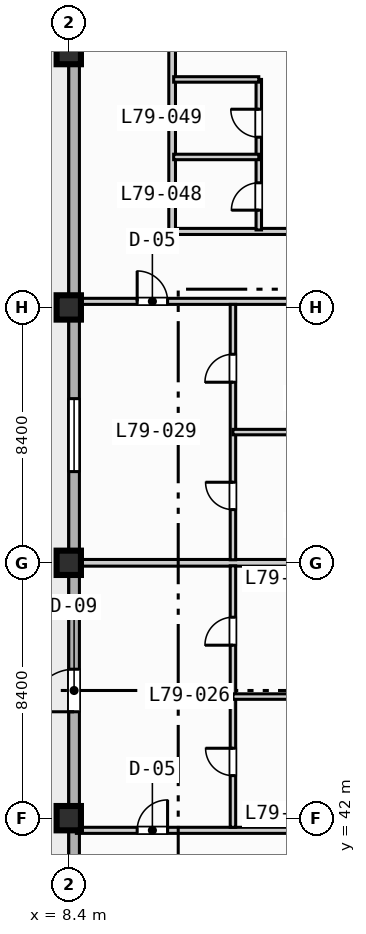
"""IFC4 building model, lengths in metres.
Left out: names, types, materials, properties, quantities, classifications, styles, units other than length and angle.
Written with IfcOpenShell. Run it as: python <this file> out.ifc"""

import sys

from ifc_helpers import new_model, si_unit, direction, frame, frame_2d, origin, origin_2d, place, context, subcontext, project, spatial, rectangle, extrude, element, fill, save


model = new_model("IFC4")
c1 = context("Model", 3, precision=1e-05, world=origin(), true_north=direction((0.0, 1.0)))
c2 = subcontext(c1, "Body", "Model", "MODEL_VIEW")
j1 = project(units=[si_unit("LENGTHUNIT", "METRE"), si_unit("PLANEANGLEUNIT", "RADIAN")], contexts=[c1])
p1 = place(None, origin())
s1 = spatial("IfcSite", under=j1, at=p1, CompositionType="ELEMENT")
p2 = place(p1, origin())
s2 = spatial("IfcBuilding", under=s1, at=p2, CompositionType="ELEMENT")
p3 = place(p2, frame((0.0, 0.0, 320.3)))
s3 = spatial("IfcBuildingStorey", under=s2, at=p3, CompositionType="ELEMENT", Elevation=320.3)
for number, where, z_axis, x_axis in (
    (1, (8.4, 42.0, 0.0), (0.0, 0.0, 1.0), (1.0, 0.0, 0.0)),
    (2, (8.4, 50.4, 0.0), (0.0, 0.0, 1.0), (1.0, 0.0, 0.0)),
    (3, (8.4, 58.8, 0.0), (0.0, 0.0, 1.0), (1.0, 0.0, 0.0)),
    (4, (8.4, 67.2, 0.0), (0.0, 0.0, 1.0), (1.0, 0.0, 0.0)),
):
    element("IfcColumn", number, at=place(p3, frame(where, z_axis=z_axis, x_axis=x_axis)), inside=s3, PredefinedType="COLUMN", context=c2, shape_type="SweptSolid", body=[
        extrude(rectangle(XDim=0.8, YDim=0.8, at=origin_2d()), origin(), (0.0, 0.0, 1.0), 3.9),
    ])
p4 = place(p3, frame((8.575, 11.575, 0.0), z_axis=(0.0, 0.0, 1.0), x_axis=(0.0, 1.0, 0.0)))
e5 = element("IfcWall", 5, at=p4, inside=s3, PredefinedType="STANDARD", context=c2, shape_type="SweptSolid", body=[
    extrude(rectangle(XDim=60.85, YDim=0.35, at=frame_2d((30.425, 0.0))), origin(), (0.0, 0.0, 1.0), 3.67),
])
p5 = place(p4, frame((33.925, 0.0, 0.0)))
e6 = element("IfcOpeningElement", 6, at=p5, cuts=e5, PredefinedType="OPENING", context=c2, shape_type="SweptSolid", body=[
    extrude(rectangle(XDim=1.4, YDim=2.2, at=frame_2d((0.7, 1.1))), frame((0.0, 0.185, 0.0), z_axis=(0.0, -1.0, 0.0), x_axis=(1.0, 0.0, 0.0)), (0.0, 0.0, 1.0), 0.37),
])
p6 = place(p4, frame((25.025, 0.0, 0.85)))
e7 = element("IfcOpeningElement", 7, at=p6, cuts=e5, PredefinedType="OPENING", context=c2, shape_type="SweptSolid", body=[
    extrude(rectangle(XDim=2.4, YDim=1.95, at=frame_2d((1.2, 0.975))), frame((0.0, 0.185, 0.0), z_axis=(0.0, -1.0, 0.0), x_axis=(1.0, 0.0, 0.0)), (0.0, 0.0, 1.0), 0.37),
])
p7 = place(p4, frame((41.825, 0.0, 0.85)))
e8 = element("IfcOpeningElement", 8, at=p7, cuts=e5, PredefinedType="OPENING", context=c2, shape_type="SweptSolid", body=[
    extrude(rectangle(XDim=2.4, YDim=1.95, at=frame_2d((1.2, 0.975))), frame((0.0, 0.185, 0.0), z_axis=(0.0, -1.0, 0.0), x_axis=(1.0, 0.0, 0.0)), (0.0, 0.0, 1.0), 0.37),
])
p8 = place(p4, frame((19.25, 0.0, 0.85)))
e9 = element("IfcOpeningElement", 9, at=p8, cuts=e5, PredefinedType="OPENING", context=c2, shape_type="SweptSolid", body=[
    extrude(rectangle(XDim=1.8, YDim=1.8, at=frame_2d((0.9, 0.9))), frame((0.0, 0.185, 0.0), z_axis=(0.0, -1.0, 0.0), x_axis=(1.0, 0.0, 0.0)), (0.0, 0.0, 1.0), 0.37),
])
p9 = place(p3, frame((8.65, 41.6, 0.0), z_axis=(0.0, 0.0, 1.0), x_axis=(1.0, 0.0, 0.0)))
e10 = element("IfcWall", 10, at=p9, inside=s3, PredefinedType="PARTITIONING", context=c2, shape_type="SweptSolid", body=[
    extrude(rectangle(XDim=7.95, YDim=0.2, at=frame_2d((3.975, 0.0))), origin(), (0.0, 0.0, 1.0), 3.67),
])
p10 = place(p9, frame((2.0, 0.0, 0.0)))
e11 = element("IfcOpeningElement", 11, at=p10, cuts=e10, PredefinedType="OPENING", context=c2, shape_type="SweptSolid", body=[
    extrude(rectangle(XDim=1.0, YDim=2.15, at=frame_2d((0.5, 1.075))), frame((0.0, 0.11, 0.0), z_axis=(0.0, -1.0, 0.0), x_axis=(1.0, 0.0, 0.0)), (0.0, 0.0, 1.0), 0.22),
])
p11 = place(p3, frame((8.65, 59.0, 0.0), z_axis=(0.0, 0.0, 1.0), x_axis=(1.0, 0.0, 0.0)))
e12 = element("IfcWall", 12, at=p11, inside=s3, PredefinedType="PARTITIONING", context=c2, shape_type="SweptSolid", body=[
    extrude(rectangle(XDim=7.95, YDim=0.2, at=frame_2d((3.975, 0.0))), origin(), (0.0, 0.0, 1.0), 3.253),
])
p12 = place(p11, frame((2.0, 0.0, 0.0)))
e13 = element("IfcOpeningElement", 13, at=p12, cuts=e12, PredefinedType="OPENING", context=c2, shape_type="SweptSolid", body=[
    extrude(rectangle(XDim=1.0, YDim=2.15, at=frame_2d((0.5, 1.075))), frame((0.0, 0.11, 0.0), z_axis=(0.0, -1.0, 0.0), x_axis=(1.0, 0.0, 0.0)), (0.0, 0.0, 1.0), 0.22),
])
p13 = place(p3, frame((8.65, 50.4, 0.0), z_axis=(0.0, 0.0, 1.0), x_axis=(1.0, 0.0, 0.0)))
e14 = element("IfcWall", 14, at=p13, inside=s3, PredefinedType="PARTITIONING", context=c2, shape_type="SweptSolid", body=[
    extrude(rectangle(XDim=7.95, YDim=0.22, at=frame_2d((3.975, 0.0))), origin(), (0.0, 0.0, 1.0), 3.07),
])
p14 = place(p3, frame((13.8, 41.7, 0.0), z_axis=(0.0, 0.0, 1.0), x_axis=(0.0, 1.0, 0.0)))
e15 = element("IfcWall", 15, at=p14, inside=s3, PredefinedType="PLUMBINGWALL", context=c2, shape_type="SweptSolid", body=[
    extrude(rectangle(XDim=8.6, YDim=0.18, at=frame_2d((4.3, 0.0))), origin(), (0.0, 0.0, 1.0), 3.67),
])
p15 = place(p14, frame((1.7, 0.0, 0.0)))
e16 = element("IfcOpeningElement", 16, at=p15, cuts=e15, PredefinedType="OPENING", context=c2, shape_type="SweptSolid", body=[
    extrude(rectangle(XDim=0.9, YDim=2.1, at=frame_2d((0.45, 1.05))), frame((0.0, 0.1, 0.0), z_axis=(0.0, -1.0, 0.0), x_axis=(1.0, 0.0, 0.0)), (0.0, 0.0, 1.0), 0.2),
])
p16 = place(p14, frame((5.99, 0.0, 0.0)))
e17 = element("IfcOpeningElement", 17, at=p16, cuts=e15, PredefinedType="OPENING", context=c2, shape_type="SweptSolid", body=[
    extrude(rectangle(XDim=0.92, YDim=2.1, at=frame_2d((0.46, 1.05))), frame((0.0, 0.1, 0.0), z_axis=(0.0, -1.0, 0.0), x_axis=(1.0, 0.0, 0.0)), (0.0, 0.0, 1.0), 0.2),
])
p17 = place(p3, frame((13.8, 46.0, 0.0), z_axis=(0.0, 0.0, 1.0), x_axis=(1.0, 0.0, 0.0)))
e18 = element("IfcWall", 18, at=p17, inside=s3, PredefinedType="PLUMBINGWALL", context=c2, shape_type="SweptSolid", body=[
    extrude(rectangle(XDim=2.8, YDim=0.18, at=frame_2d((1.4, 0.0))), origin(), (0.0, 0.0, 1.0), 3.67),
])
p18 = place(p3, frame((13.8, 50.5, 0.0), z_axis=(0.0, 0.0, 1.0), x_axis=(0.0, 1.0, 0.0)))
e19 = element("IfcWall", 19, at=p18, inside=s3, PredefinedType="PLUMBINGWALL", context=c2, shape_type="SweptSolid", body=[
    extrude(rectangle(XDim=8.4, YDim=0.18, at=frame_2d((4.2, 0.0))), origin(), (0.0, 0.0, 1.0), 3.67),
])
p19 = place(p18, frame((1.65, 0.0, 0.0)))
e20 = element("IfcOpeningElement", 20, at=p19, cuts=e19, PredefinedType="OPENING", context=c2, shape_type="SweptSolid", body=[
    extrude(rectangle(XDim=0.9, YDim=2.1, at=frame_2d((0.45, 1.05))), frame((0.0, 0.1, 0.0), z_axis=(0.0, -1.0, 0.0), x_axis=(1.0, 0.0, 0.0)), (0.0, 0.0, 1.0), 0.2),
])
p20 = place(p18, frame((5.84, 0.0, 0.0)))
e21 = element("IfcOpeningElement", 21, at=p20, cuts=e19, PredefinedType="OPENING", context=c2, shape_type="SweptSolid", body=[
    extrude(rectangle(XDim=0.92, YDim=2.1, at=frame_2d((0.46, 1.05))), frame((0.0, 0.1, 0.0), z_axis=(0.0, -1.0, 0.0), x_axis=(1.0, 0.0, 0.0)), (0.0, 0.0, 1.0), 0.2),
])
p21 = place(p3, frame((13.8, 54.7, 0.0), z_axis=(0.0, 0.0, 1.0), x_axis=(1.0, 0.0, 0.0)))
e22 = element("IfcWall", 22, at=p21, inside=s3, PredefinedType="PLUMBINGWALL", context=c2, shape_type="SweptSolid", body=[
    extrude(rectangle(XDim=2.8, YDim=0.18, at=frame_2d((1.4, 0.0))), origin(), (0.0, 0.0, 1.0), 3.67),
])
p22 = place(p3, frame((11.8, 61.3, 0.0), z_axis=(0.0, 0.0, 1.0), x_axis=(1.0, 0.0, 0.0)))
e23 = element("IfcWall", 23, at=p22, inside=s3, PredefinedType="PARTITIONING", context=c2, shape_type="SweptSolid", body=[
    extrude(rectangle(XDim=21.35, YDim=0.2, at=frame_2d((10.675, 0.0))), origin(), (0.0, 0.0, 1.0), 3.67),
])
p23 = place(p22, frame((4.05, 0.0, 0.0)))
e24 = element("IfcOpeningElement", 24, at=p23, cuts=e23, PredefinedType="OPENING", context=c2, shape_type="SweptSolid", body=[
    extrude(rectangle(XDim=1.0, YDim=2.15, at=frame_2d((0.5, 1.075))), frame((0.0, 0.11, 0.0), z_axis=(0.0, -1.0, 0.0), x_axis=(1.0, 0.0, 0.0)), (0.0, 0.0, 1.0), 0.22),
])
p24 = place(p3, frame((11.8, 61.3, 0.0), z_axis=(0.0, 0.0, 1.0), x_axis=(0.0, 1.0, 0.0)))
e25 = element("IfcWall", 25, at=p24, inside=s3, PredefinedType="PARTITIONING", context=c2, shape_type="SweptSolid", body=[
    extrude(rectangle(XDim=11.1, YDim=0.22, at=frame_2d((5.55, 0.0))), origin(), (0.0, 0.0, 1.0), 3.67),
])
p25 = place(p3, frame((14.65, 61.35, 0.0), z_axis=(0.0, 0.0, 1.0), x_axis=(0.0, 1.0, 0.0)))
e26 = element("IfcWall", 26, at=p25, inside=s3, PredefinedType="PLUMBINGWALL", context=c2, shape_type="SweptSolid", body=[
    extrude(rectangle(XDim=4.95, YDim=0.18, at=frame_2d((2.475, 0.0))), origin(), (0.0, 0.0, 1.0), 3.67),
])
p26 = place(p25, frame((0.65, 0.0, 0.0)))
e27 = element("IfcOpeningElement", 27, at=p26, cuts=e26, PredefinedType="OPENING", context=c2, shape_type="SweptSolid", body=[
    extrude(rectangle(XDim=0.9, YDim=2.1, at=frame_2d((0.45, 1.05))), frame((0.0, 0.1, 0.0), z_axis=(0.0, -1.0, 0.0), x_axis=(1.0, 0.0, 0.0)), (0.0, 0.0, 1.0), 0.2),
])
p27 = place(p25, frame((3.05, 0.0, 0.0)))
e28 = element("IfcOpeningElement", 28, at=p27, cuts=e26, PredefinedType="OPENING", context=c2, shape_type="SweptSolid", body=[
    extrude(rectangle(XDim=0.92, YDim=2.1, at=frame_2d((0.46, 1.05))), frame((0.0, 0.1, 0.0), z_axis=(0.0, -1.0, 0.0), x_axis=(1.0, 0.0, 0.0)), (0.0, 0.0, 1.0), 0.2),
])
for number, where, z_axis, x_axis in (
    (29, (11.85, 63.75, 0.0), (0.0, 0.0, 1.0), (1.0, 0.0, 0.0)),
    (30, (11.85, 66.3, 0.0), (0.0, 0.0, 1.0), (1.0, 0.0, 0.0)),
):
    element("IfcWall", number, at=place(p3, frame(where, z_axis=z_axis, x_axis=x_axis)), inside=s3, PredefinedType="PLUMBINGWALL", context=c2, shape_type="SweptSolid", body=[
        extrude(rectangle(XDim=2.8, YDim=0.18, at=frame_2d((1.4, 0.0))), origin(), (0.0, 0.0, 1.0), 3.67),
    ])
p28 = place(p5, origin())
e31 = element("IfcDoor", 31, at=p28, inside=s3, OperationType="SINGLE_SWING_LEFT", PredefinedType="DOOR", context=c2, shape_type="SweptSolid", body=[
    extrude(rectangle(XDim=1.4, YDim=2.2, at=frame_2d((0.7, 1.1))), frame((0.0, 0.025, 0.0), z_axis=(0.0, -1.0, 0.0), x_axis=(1.0, 0.0, 0.0)), (0.0, 0.0, 1.0), 0.05),
])
fill(e6, e31)
p29 = place(p7, origin())
e32 = element("IfcWindow", 32, at=p29, inside=s3, PartitioningType="SINGLE_PANEL", PredefinedType="WINDOW", context=c2, shape_type="SweptSolid", body=[
    extrude(rectangle(XDim=2.4, YDim=1.95, at=frame_2d((1.2, 0.975))), frame((0.0, 0.03, 0.0), z_axis=(0.0, -1.0, 0.0), x_axis=(1.0, 0.0, 0.0)), (0.0, 0.0, 1.0), 0.06),
])
fill(e8, e32)
p30 = place(p10, origin())
e33 = element("IfcDoor", 33, at=p30, inside=s3, OperationType="SINGLE_SWING_RIGHT", PredefinedType="DOOR", context=c2, shape_type="SweptSolid", body=[
    extrude(rectangle(XDim=1.0, YDim=2.15, at=frame_2d((0.5, 1.075))), frame((0.0, 0.025, 0.0), z_axis=(0.0, -1.0, 0.0), x_axis=(1.0, 0.0, 0.0)), (0.0, 0.0, 1.0), 0.05),
])
fill(e11, e33)
p31 = place(p12, origin())
e34 = element("IfcDoor", 34, at=p31, inside=s3, OperationType="SINGLE_SWING_LEFT", PredefinedType="DOOR", context=c2, shape_type="SweptSolid", body=[
    extrude(rectangle(XDim=1.0, YDim=2.15, at=frame_2d((0.5, 1.075))), frame((0.0, 0.025, 0.0), z_axis=(0.0, -1.0, 0.0), x_axis=(1.0, 0.0, 0.0)), (0.0, 0.0, 1.0), 0.05),
])
fill(e13, e34)
p32 = place(p15, origin())
e35 = element("IfcDoor", 35, at=p32, inside=s3, OperationType="SINGLE_SWING_RIGHT", PredefinedType="DOOR", context=c2, shape_type="SweptSolid", body=[
    extrude(rectangle(XDim=0.9, YDim=2.1, at=frame_2d((0.45, 1.05))), frame((0.0, 0.025, 0.0), z_axis=(0.0, -1.0, 0.0), x_axis=(1.0, 0.0, 0.0)), (0.0, 0.0, 1.0), 0.05),
])
fill(e16, e35)
p33 = place(p16, origin())
e36 = element("IfcDoor", 36, at=p33, inside=s3, OperationType="SINGLE_SWING_LEFT", PredefinedType="DOOR", context=c2, shape_type="SweptSolid", body=[
    extrude(rectangle(XDim=0.92, YDim=2.1, at=frame_2d((0.46, 1.05))), frame((0.0, 0.025, 0.0), z_axis=(0.0, -1.0, 0.0), x_axis=(1.0, 0.0, 0.0)), (0.0, 0.0, 1.0), 0.05),
])
fill(e17, e36)
p34 = place(p19, origin())
e37 = element("IfcDoor", 37, at=p34, inside=s3, OperationType="SINGLE_SWING_RIGHT", PredefinedType="DOOR", context=c2, shape_type="SweptSolid", body=[
    extrude(rectangle(XDim=0.9, YDim=2.1, at=frame_2d((0.45, 1.05))), frame((0.0, 0.025, 0.0), z_axis=(0.0, -1.0, 0.0), x_axis=(1.0, 0.0, 0.0)), (0.0, 0.0, 1.0), 0.05),
])
fill(e20, e37)
p35 = place(p20, origin())
e38 = element("IfcDoor", 38, at=p35, inside=s3, OperationType="SINGLE_SWING_LEFT", PredefinedType="DOOR", context=c2, shape_type="SweptSolid", body=[
    extrude(rectangle(XDim=0.92, YDim=2.1, at=frame_2d((0.46, 1.05))), frame((0.0, 0.025, 0.0), z_axis=(0.0, -1.0, 0.0), x_axis=(1.0, 0.0, 0.0)), (0.0, 0.0, 1.0), 0.05),
])
fill(e21, e38)
p36 = place(p26, origin())
e39 = element("IfcDoor", 39, at=p36, inside=s3, OperationType="SINGLE_SWING_LEFT", PredefinedType="DOOR", context=c2, shape_type="SweptSolid", body=[
    extrude(rectangle(XDim=0.9, YDim=2.1, at=frame_2d((0.45, 1.05))), frame((0.0, 0.025, 0.0), z_axis=(0.0, -1.0, 0.0), x_axis=(1.0, 0.0, 0.0)), (0.0, 0.0, 1.0), 0.05),
])
fill(e27, e39)
p37 = place(p27, origin())
e40 = element("IfcDoor", 40, at=p37, inside=s3, OperationType="SINGLE_SWING_RIGHT", PredefinedType="DOOR", context=c2, shape_type="SweptSolid", body=[
    extrude(rectangle(XDim=0.92, YDim=2.1, at=frame_2d((0.46, 1.05))), frame((0.0, 0.025, 0.0), z_axis=(0.0, -1.0, 0.0), x_axis=(1.0, 0.0, 0.0)), (0.0, 0.0, 1.0), 0.05),
])
fill(e28, e40)
save(model, sys.argv[1])
